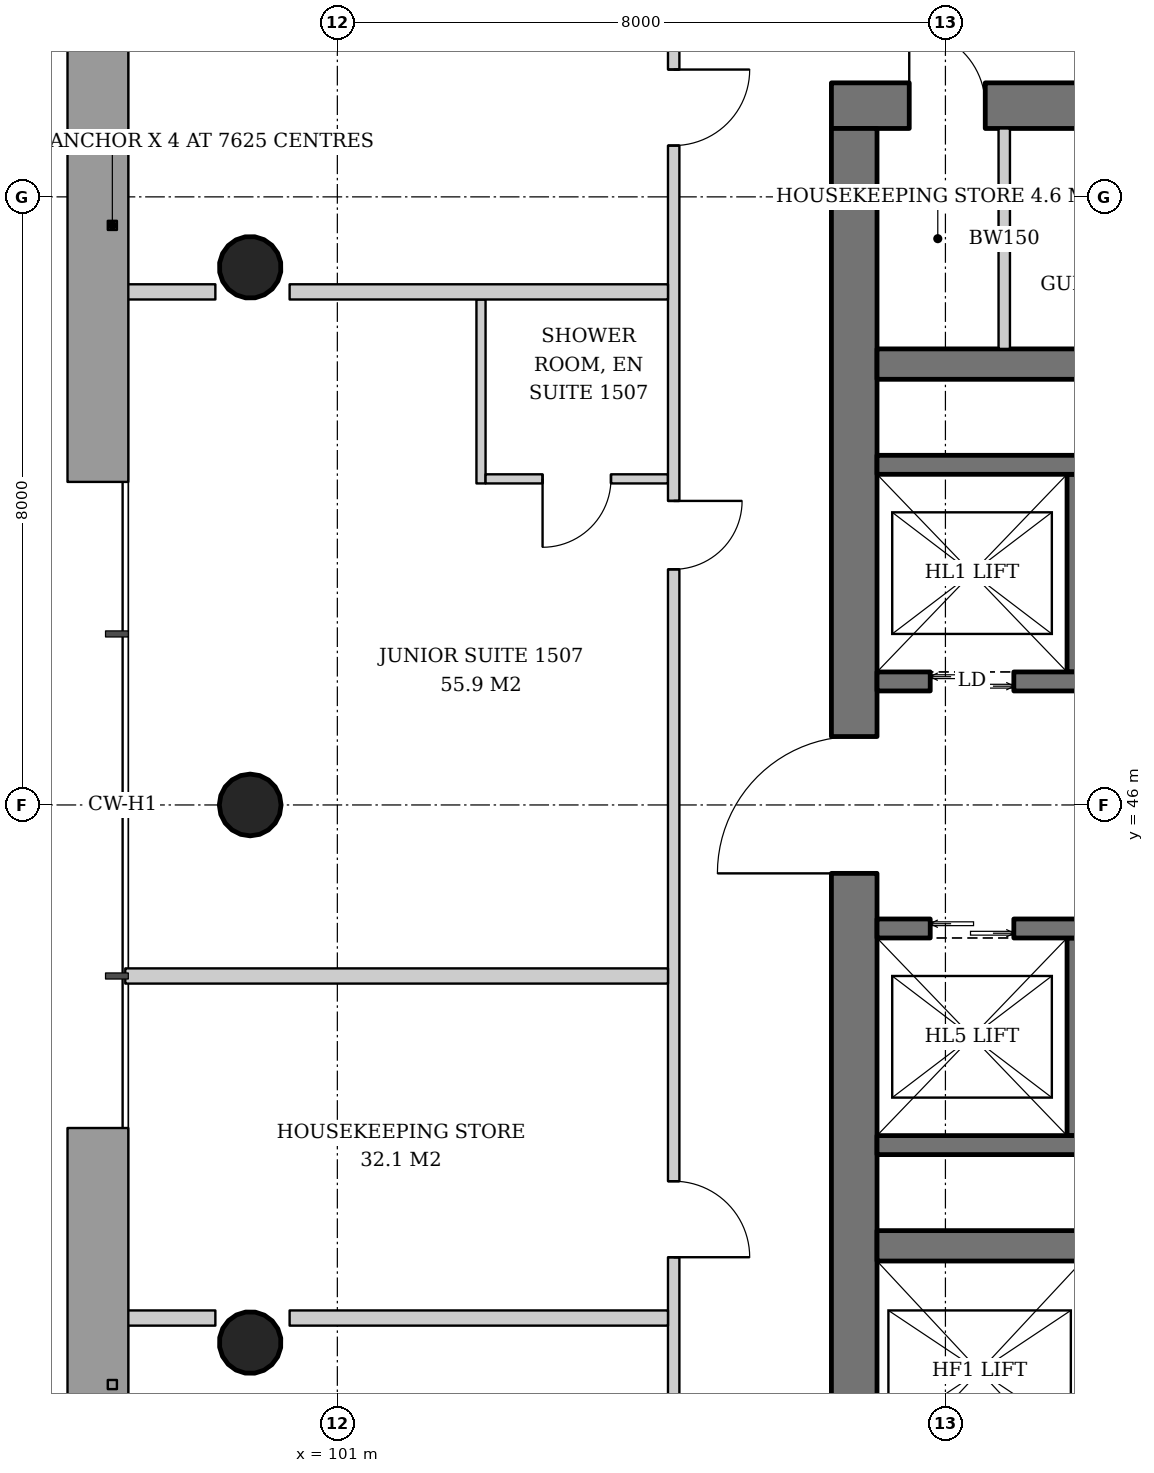
"""IFC4 building model, lengths in metres.
Left out: names, types, materials, properties, quantities, classifications, styles, units other than length and angle.
Written with IfcOpenShell. Run it as: python <this file> out.ifc"""

import sys

from ifc_helpers import new_model, si_unit, direction, frame, frame_2d, origin, origin_2d, place, context, subcontext, project, spatial, rectangle, hollow_circle, extrude, element, fill, save


model = new_model("IFC4")
c1 = context("Model", 3, precision=1e-05, world=origin(), true_north=direction((0.0, 1.0)))
c2 = subcontext(c1, "Body", "Model", "MODEL_VIEW")
j1 = project(units=[si_unit("LENGTHUNIT", "METRE"), si_unit("PLANEANGLEUNIT", "RADIAN")], contexts=[c1])
p1 = place(None, origin())
s1 = spatial("IfcSite", under=j1, at=p1, CompositionType="ELEMENT")
p2 = place(p1, origin())
s2 = spatial("IfcBuilding", under=s1, at=p2, CompositionType="ELEMENT")
p3 = place(p2, frame((0.0, 0.0, 62.8)))
s3 = spatial("IfcBuildingStorey", under=s2, at=p3, CompositionType="ELEMENT", Elevation=62.8)
p4 = place(p3, frame((99.802, 53.099, 0.0), z_axis=(0.043059584825, -0.021497706284, 0.998841188968), x_axis=(0.446680166538, 0.894693706707, 0.0)))
e1 = element("IfcColumn", 1, at=p4, inside=s3, PredefinedType="COLUMN", context=c2, shape_type="SweptSolid", body=[
    extrude(hollow_circle(Radius=0.406, WallThickness=0.03, at=origin_2d()), origin(), (0.0, 0.0, 1.0), 3.804),
])
p5 = place(p3, frame((99.802, 46.0, 0.0), z_axis=(0.043069538298, 0.0, 0.999072076915), x_axis=(0.0, 1.0, 0.0)))
e2 = element("IfcColumn", 2, at=p5, inside=s3, PredefinedType="COLUMN", context=c2, shape_type="SweptSolid", body=[
    extrude(hollow_circle(Radius=0.406, WallThickness=0.03, at=origin_2d()), origin(), (0.0, 0.0, 1.0), 3.803),
])
p6 = place(p3, frame((99.802, 38.901, 0.0), z_axis=(0.043059584825, 0.021497706284, 0.998841188968), x_axis=(-0.446680166538, 0.894693706707, 0.0)))
e3 = element("IfcColumn", 3, at=p6, inside=s3, PredefinedType="COLUMN", context=c2, shape_type="SweptSolid", body=[
    extrude(hollow_circle(Radius=0.406, WallThickness=0.03, at=origin_2d()), origin(), (0.0, 0.0, 1.0), 3.804),
])
p7 = place(p3, frame((107.5, 55.2, 0.0), z_axis=(0.0, 0.0, 1.0), x_axis=(1.0, 0.0, 0.0)))
e4 = element("IfcWall", 4, at=p7, inside=s3, PredefinedType="SHEAR", context=c2, shape_type="SweptSolid", body=[
    extrude(rectangle(XDim=19.0, YDim=0.6, at=frame_2d((9.5, 0.0))), origin(), (0.0, 0.0, 1.0), 3.8),
])
p8 = place(p7, frame((14.14, 0.0, 0.0)))
e5 = element("IfcOpeningElement", 5, at=p8, cuts=e4, PredefinedType="OPENING", context=c2, shape_type="SweptSolid", body=[
    extrude(rectangle(XDim=1.0, YDim=2.1, at=frame_2d((0.5, 1.05))), frame((0.0, 0.31, 0.0), z_axis=(0.0, -1.0, 0.0), x_axis=(1.0, 0.0, 0.0)), (0.0, 0.0, 1.0), 0.62),
])
p9 = place(p7, frame((1.024, 0.0, 0.0)))
e6 = element("IfcOpeningElement", 6, at=p9, cuts=e4, PredefinedType="OPENING", context=c2, shape_type="SweptSolid", body=[
    extrude(rectangle(XDim=1.0, YDim=2.1, at=frame_2d((0.5, 1.05))), frame((0.0, 0.31, 0.0), z_axis=(0.0, -1.0, 0.0), x_axis=(1.0, 0.0, 0.0)), (0.0, 0.0, 1.0), 0.62),
])
p10 = place(p7, frame((3.262, 0.0, 0.0)))
e7 = element("IfcOpeningElement", 7, at=p10, cuts=e4, PredefinedType="OPENING", context=c2, shape_type="SweptSolid", body=[
    extrude(rectangle(XDim=1.0, YDim=2.1, at=frame_2d((0.5, 1.05))), frame((0.0, 0.31, 0.0), z_axis=(0.0, -1.0, 0.0), x_axis=(1.0, 0.0, 0.0)), (0.0, 0.0, 1.0), 0.62),
])
p11 = place(p3, frame((107.8, 37.1, 0.0), z_axis=(0.0, 0.0, 1.0), x_axis=(0.0, 1.0, 0.0)))
e8 = element("IfcWall", 8, at=p11, inside=s3, PredefinedType="SHEAR", context=c2, shape_type="SweptSolid", body=[
    extrude(rectangle(XDim=17.8, YDim=0.6, at=frame_2d((8.9, 0.0))), origin(), (0.0, 0.0, 1.0), 3.8),
])
p12 = place(p11, frame((8.0, 0.0, 0.0)))
e9 = element("IfcOpeningElement", 9, at=p12, cuts=e8, PredefinedType="OPENING", context=c2, shape_type="SweptSolid", body=[
    extrude(rectangle(XDim=1.8, YDim=2.4, at=frame_2d((0.9, 1.2))), frame((0.0, 0.31, 0.0), z_axis=(0.0, -1.0, 0.0), x_axis=(1.0, 0.0, 0.0)), (0.0, 0.0, 1.0), 0.62),
])
for number, where, z_axis, x_axis in (
    (10, (108.1, 40.2, 0.0), (0.0, 0.0, 1.0), (1.0, 0.0, 0.0)),
    (11, (108.1, 51.8, 0.0), (0.0, 0.0, 1.0), (1.0, 0.0, 0.0)),
):
    element("IfcWall", number, at=place(p3, frame(where, z_axis=z_axis, x_axis=x_axis)), inside=s3, PredefinedType="SHEAR", context=c2, shape_type="SweptSolid", body=[
        extrude(rectangle(XDim=17.8, YDim=0.4, at=frame_2d((8.9, 0.0))), origin(), (0.0, 0.0, 1.0), 3.8),
    ])
p13 = place(p3, frame((110.725, 47.75, 0.0), z_axis=(0.0, 0.0, 1.0), x_axis=(0.0, 1.0, 0.0)))
e12 = element("IfcWall", 12, at=p13, inside=s3, PredefinedType="SHEAR", context=c2, shape_type="SweptSolid", body=[
    extrude(rectangle(XDim=2.6, YDim=0.25, at=frame_2d((1.3, 0.0))), origin(), (0.0, 0.0, 1.0), 3.8),
])
p14 = place(p3, frame((108.1, 50.475, 0.0), z_axis=(0.0, 0.0, 1.0), x_axis=(1.0, 0.0, 0.0)))
e13 = element("IfcWall", 13, at=p14, inside=s3, PredefinedType="SHEAR", context=c2, shape_type="SweptSolid", body=[
    extrude(rectangle(XDim=11.0, YDim=0.25, at=frame_2d((5.5, 0.0))), origin(), (0.0, 0.0, 1.0), 3.8),
])
p15 = place(p3, frame((108.1, 47.625, 0.0), z_axis=(0.0, 0.0, 1.0), x_axis=(1.0, 0.0, 0.0)))
e14 = element("IfcWall", 14, at=p15, inside=s3, PredefinedType="SHEAR", context=c2, shape_type="SweptSolid", body=[
    extrude(rectangle(XDim=12.83, YDim=0.25, at=frame_2d((6.415, 0.0))), origin(), (0.0, 0.0, 1.0), 3.8),
])
p16 = place(p15, frame((0.7, 0.0, 0.0)))
e15 = element("IfcOpeningElement", 15, at=p16, cuts=e14, PredefinedType="OPENING", context=c2, shape_type="SweptSolid", body=[
    extrude(rectangle(XDim=1.1, YDim=2.2, at=frame_2d((0.55, 1.1))), frame((0.0, 0.135, 0.0), z_axis=(0.0, -1.0, 0.0), x_axis=(1.0, 0.0, 0.0)), (0.0, 0.0, 1.0), 0.27),
])
p17 = place(p15, frame((3.45, 0.0, 0.0)))
e16 = element("IfcOpeningElement", 16, at=p17, cuts=e14, PredefinedType="OPENING", context=c2, shape_type="SweptSolid", body=[
    extrude(rectangle(XDim=1.1, YDim=2.2, at=frame_2d((0.55, 1.1))), frame((0.0, 0.135, 0.0), z_axis=(0.0, -1.0, 0.0), x_axis=(1.0, 0.0, 0.0)), (0.0, 0.0, 1.0), 0.27),
])
p18 = place(p15, frame((6.2, 0.0, 0.0)))
e17 = element("IfcOpeningElement", 17, at=p18, cuts=e14, PredefinedType="OPENING", context=c2, shape_type="SweptSolid", body=[
    extrude(rectangle(XDim=1.1, YDim=2.2, at=frame_2d((0.55, 1.1))), frame((0.0, 0.135, 0.0), z_axis=(0.0, -1.0, 0.0), x_axis=(1.0, 0.0, 0.0)), (0.0, 0.0, 1.0), 0.27),
])
p19 = place(p15, frame((8.95, 0.0, 0.0)))
e18 = element("IfcOpeningElement", 18, at=p19, cuts=e14, PredefinedType="OPENING", context=c2, shape_type="SweptSolid", body=[
    extrude(rectangle(XDim=1.1, YDim=2.2, at=frame_2d((0.55, 1.1))), frame((0.0, 0.135, 0.0), z_axis=(0.0, -1.0, 0.0), x_axis=(1.0, 0.0, 0.0)), (0.0, 0.0, 1.0), 0.27),
])
p20 = place(p15, frame((11.515, 0.0, 0.0)))
e19 = element("IfcOpeningElement", 19, at=p20, cuts=e14, PredefinedType="OPENING", context=c2, shape_type="SweptSolid", body=[
    extrude(rectangle(XDim=0.8, YDim=2.0, at=frame_2d((0.4, 1.0))), frame((0.0, 0.135, 0.0), z_axis=(0.0, -1.0, 0.0), x_axis=(1.0, 0.0, 0.0)), (0.0, 0.0, 1.0), 0.27),
])
p21 = place(p3, frame((110.725, 44.25, 0.0), z_axis=(0.0, 0.0, 1.0), x_axis=(0.0, -1.0, 0.0)))
e20 = element("IfcWall", 20, at=p21, inside=s3, PredefinedType="SHEAR", context=c2, shape_type="SweptSolid", body=[
    extrude(rectangle(XDim=2.6, YDim=0.25, at=frame_2d((1.3, 0.0))), origin(), (0.0, 0.0, 1.0), 3.8),
])
p22 = place(p3, frame((108.1, 41.525, 0.0), z_axis=(0.0, 0.0, 1.0), x_axis=(1.0, 0.0, 0.0)))
e21 = element("IfcWall", 21, at=p22, inside=s3, PredefinedType="SHEAR", context=c2, shape_type="SweptSolid", body=[
    extrude(rectangle(XDim=11.0, YDim=0.25, at=frame_2d((5.5, 0.0))), origin(), (0.0, 0.0, 1.0), 3.8),
])
p23 = place(p3, frame((108.1, 44.375, 0.0), z_axis=(0.0, 0.0, 1.0), x_axis=(1.0, 0.0, 0.0)))
e22 = element("IfcWall", 22, at=p23, inside=s3, PredefinedType="SHEAR", context=c2, shape_type="SweptSolid", body=[
    extrude(rectangle(XDim=12.83, YDim=0.25, at=frame_2d((6.415, 0.0))), origin(), (0.0, 0.0, 1.0), 3.8),
])
p24 = place(p23, frame((0.7, 0.0, 0.0)))
e23 = element("IfcOpeningElement", 23, at=p24, cuts=e22, PredefinedType="OPENING", context=c2, shape_type="SweptSolid", body=[
    extrude(rectangle(XDim=1.1, YDim=2.2, at=frame_2d((0.55, 1.1))), frame((0.0, 0.135, 0.0), z_axis=(0.0, -1.0, 0.0), x_axis=(1.0, 0.0, 0.0)), (0.0, 0.0, 1.0), 0.27),
])
p25 = place(p23, frame((3.45, 0.0, 0.0)))
e24 = element("IfcOpeningElement", 24, at=p25, cuts=e22, PredefinedType="OPENING", context=c2, shape_type="SweptSolid", body=[
    extrude(rectangle(XDim=1.1, YDim=2.2, at=frame_2d((0.55, 1.1))), frame((0.0, 0.135, 0.0), z_axis=(0.0, -1.0, 0.0), x_axis=(1.0, 0.0, 0.0)), (0.0, 0.0, 1.0), 0.27),
])
p26 = place(p23, frame((6.2, 0.0, 0.0)))
e25 = element("IfcOpeningElement", 25, at=p26, cuts=e22, PredefinedType="OPENING", context=c2, shape_type="SweptSolid", body=[
    extrude(rectangle(XDim=1.1, YDim=2.2, at=frame_2d((0.55, 1.1))), frame((0.0, 0.135, 0.0), z_axis=(0.0, -1.0, 0.0), x_axis=(1.0, 0.0, 0.0)), (0.0, 0.0, 1.0), 0.27),
])
p27 = place(p23, frame((9.0, 0.0, 0.0)))
e26 = element("IfcOpeningElement", 26, at=p27, cuts=e22, PredefinedType="OPENING", context=c2, shape_type="SweptSolid", body=[
    extrude(rectangle(XDim=1.0, YDim=2.1, at=frame_2d((0.5, 1.05))), frame((0.0, 0.135, 0.0), z_axis=(0.0, -1.0, 0.0), x_axis=(1.0, 0.0, 0.0)), (0.0, 0.0, 1.0), 0.27),
])
p28 = place(p23, frame((11.515, 0.0, 0.0)))
e27 = element("IfcOpeningElement", 27, at=p28, cuts=e22, PredefinedType="OPENING", context=c2, shape_type="SweptSolid", body=[
    extrude(rectangle(XDim=0.8, YDim=2.0, at=frame_2d((0.4, 1.0))), frame((0.0, 0.135, 0.0), z_axis=(0.0, -1.0, 0.0), x_axis=(1.0, 0.0, 0.0)), (0.0, 0.0, 1.0), 0.27),
])
p29 = place(p3, frame((109.774, 52.0, 0.0), z_axis=(0.0, 0.0, 1.0), x_axis=(0.0, 1.0, 0.0)))
e28 = element("IfcWall", 28, at=p29, inside=s3, PredefinedType="SOLIDWALL", context=c2, shape_type="SweptSolid", body=[
    extrude(rectangle(XDim=2.9, YDim=0.15, at=frame_2d((1.45, 0.0))), origin(), (0.0, 0.0, 1.0), 3.6),
])
p30 = place(p3, frame((102.89, 52.65, 0.0), z_axis=(0.0, 0.0, 1.0), x_axis=(0.0, -1.0, 0.0)))
e29 = element("IfcWall", 29, at=p30, inside=s3, PredefinedType="PARTITIONING", context=c2, shape_type="SweptSolid", body=[
    extrude(rectangle(XDim=2.42, YDim=0.12, at=frame_2d((1.21, 0.0))), origin(), (0.0, 0.0, 1.0), 2.847),
])
p31 = place(p3, frame((105.35, 50.29, 0.0), z_axis=(0.0, 0.0, 1.0), x_axis=(-1.0, 0.0, 0.0)))
e30 = element("IfcWall", 30, at=p31, inside=s3, PredefinedType="PARTITIONING", context=c2, shape_type="SweptSolid", body=[
    extrude(rectangle(XDim=2.4, YDim=0.12, at=frame_2d((1.2, 0.0))), origin(), (0.0, 0.0, 1.0), 3.6),
])
p32 = place(p31, frame((0.75, 0.0, 0.0)))
e31 = element("IfcOpeningElement", 31, at=p32, cuts=e30, PredefinedType="OPENING", context=c2, shape_type="SweptSolid", body=[
    extrude(rectangle(XDim=0.9, YDim=2.1, at=frame_2d((0.45, 1.05))), frame((0.0, 0.07, 0.0), z_axis=(0.0, -1.0, 0.0), x_axis=(1.0, 0.0, 0.0)), (0.0, 0.0, 1.0), 0.14),
])
p33 = place(p3, frame((105.425, 57.65, 0.0), z_axis=(0.0, 0.0, 1.0), x_axis=(0.0, -1.0, 0.0)))
e32 = element("IfcWall", 32, at=p33, inside=s3, PredefinedType="PARTITIONING", context=c2, shape_type="SweptSolid", body=[
    extrude(rectangle(XDim=23.15, YDim=0.15, at=frame_2d((11.575, 0.0))), origin(), (0.0, 0.0, 1.0), 2.8),
])
p34 = place(p33, frame((1.975, 0.0, 0.0)))
e33 = element("IfcOpeningElement", 33, at=p34, cuts=e32, PredefinedType="OPENING", context=c2, shape_type="SweptSolid", body=[
    extrude(rectangle(XDim=1.0, YDim=2.1, at=frame_2d((0.5, 1.05))), frame((0.0, 0.085, 0.0), z_axis=(0.0, -1.0, 0.0), x_axis=(1.0, 0.0, 0.0)), (0.0, 0.0, 1.0), 0.17),
])
p35 = place(p33, frame((7.65, 0.0, 0.0)))
e34 = element("IfcOpeningElement", 34, at=p35, cuts=e32, PredefinedType="OPENING", context=c2, shape_type="SweptSolid", body=[
    extrude(rectangle(XDim=0.9, YDim=2.1, at=frame_2d((0.45, 1.05))), frame((0.0, 0.085, 0.0), z_axis=(0.0, -1.0, 0.0), x_axis=(1.0, 0.0, 0.0)), (0.0, 0.0, 1.0), 0.17),
])
p36 = place(p33, frame((16.6, 0.0, 0.0)))
e35 = element("IfcOpeningElement", 35, at=p36, cuts=e32, PredefinedType="OPENING", context=c2, shape_type="SweptSolid", body=[
    extrude(rectangle(XDim=1.0, YDim=2.1, at=frame_2d((0.5, 1.05))), frame((0.0, 0.085, 0.0), z_axis=(0.0, -1.0, 0.0), x_axis=(1.0, 0.0, 0.0)), (0.0, 0.0, 1.0), 0.17),
])
p37 = place(p3, frame((105.35, 52.75, 0.0), z_axis=(0.0, 0.0, 1.0), x_axis=(-1.0, 0.0, 0.0)))
e36 = element("IfcWall", 36, at=p37, inside=s3, PredefinedType="PARTITIONING", context=c2, shape_type="SweptSolid", body=[
    extrude(rectangle(XDim=4.978, YDim=0.2, at=frame_2d((2.489, 0.0))), origin(), (0.0, 0.0, 1.0), 3.6),
])
p38 = place(p3, frame((99.395, 52.75, 0.0), z_axis=(0.0, 0.0, 1.0), x_axis=(-1.0, 0.0, 0.0)))
e37 = element("IfcWall", 37, at=p38, inside=s3, PredefinedType="PARTITIONING", context=c2, shape_type="SweptSolid", body=[
    extrude(rectangle(XDim=1.185, YDim=0.2, at=frame_2d((0.593, 0.0))), origin(), (0.0, 0.0, 1.0), 3.6),
])
p39 = place(p3, frame((105.35, 43.75, 0.0), z_axis=(0.0, 0.0, 1.0), x_axis=(-1.0, 0.0, 0.0)))
e38 = element("IfcWall", 38, at=p39, inside=s3, PredefinedType="PARTITIONING", context=c2, shape_type="SweptSolid", body=[
    extrude(rectangle(XDim=7.14, YDim=0.2, at=frame_2d((3.57, 0.0))), origin(), (0.0, 0.0, 1.0), 3.05),
])
p40 = place(p3, frame((105.35, 39.25, 0.0), z_axis=(0.0, 0.0, 1.0), x_axis=(-1.0, 0.0, 0.0)))
e39 = element("IfcWall", 39, at=p40, inside=s3, PredefinedType="PARTITIONING", context=c2, shape_type="SweptSolid", body=[
    extrude(rectangle(XDim=4.978, YDim=0.2, at=frame_2d((2.489, 0.0))), origin(), (0.0, 0.0, 1.0), 3.6),
])
p41 = place(p3, frame((99.395, 39.25, 0.0), z_axis=(0.0, 0.0, 1.0), x_axis=(-1.0, 0.0, 0.0)))
e40 = element("IfcWall", 40, at=p41, inside=s3, PredefinedType="PARTITIONING", context=c2, shape_type="SweptSolid", body=[
    extrude(rectangle(XDim=1.185, YDim=0.2, at=frame_2d((0.593, 0.0))), origin(), (0.0, 0.0, 1.0), 3.6),
])
p42 = place(p16, origin())
e41 = element("IfcDoor", 41, at=p42, inside=s3, OperationType="DOUBLE_DOOR_SLIDING", PredefinedType="DOOR", context=c2, shape_type="SweptSolid", body=[
    extrude(rectangle(XDim=1.1, YDim=2.2, at=frame_2d((0.55, 1.1))), frame((0.0, 0.025, 0.0), z_axis=(0.0, -1.0, 0.0), x_axis=(1.0, 0.0, 0.0)), (0.0, 0.0, 1.0), 0.05),
])
fill(e15, e41)
p43 = place(p24, origin())
e42 = element("IfcDoor", 42, at=p43, inside=s3, OperationType="DOUBLE_DOOR_SLIDING", PredefinedType="DOOR", context=c2, shape_type="SweptSolid", body=[
    extrude(rectangle(XDim=1.1, YDim=2.2, at=frame_2d((0.55, 1.1))), frame((0.0, 0.025, 0.0), z_axis=(0.0, -1.0, 0.0), x_axis=(1.0, 0.0, 0.0)), (0.0, 0.0, 1.0), 0.05),
])
fill(e23, e42)
p44 = place(p12, origin())
e43 = element("IfcDoor", 43, at=p44, inside=s3, OperationType="DOUBLE_DOOR_SINGLE_SWING", PredefinedType="DOOR", context=c2, shape_type="SweptSolid", body=[
    extrude(rectangle(XDim=1.8, YDim=2.4, at=frame_2d((0.9, 1.2))), frame((0.0, 0.025, 0.0), z_axis=(0.0, -1.0, 0.0), x_axis=(1.0, 0.0, 0.0)), (0.0, 0.0, 1.0), 0.05),
])
fill(e9, e43)
p45 = place(p9, origin())
e44 = element("IfcDoor", 44, at=p45, inside=s3, OperationType="SINGLE_SWING_LEFT", PredefinedType="DOOR", context=c2, shape_type="SweptSolid", body=[
    extrude(rectangle(XDim=1.0, YDim=2.1, at=frame_2d((0.5, 1.05))), frame((0.0, -0.24, 0.0), z_axis=(0.0, -1.0, 0.0), x_axis=(1.0, 0.0, 0.0)), (0.0, 0.0, 1.0), 0.05),
])
fill(e6, e44)
p46 = place(p32, origin())
e45 = element("IfcDoor", 45, at=p46, inside=s3, OperationType="SINGLE_SWING_RIGHT", PredefinedType="DOOR", context=c2, shape_type="SweptSolid", body=[
    extrude(rectangle(XDim=0.9, YDim=2.1, at=frame_2d((0.45, 1.05))), frame((0.0, 0.025, 0.0), z_axis=(0.0, -1.0, 0.0), x_axis=(1.0, 0.0, 0.0)), (0.0, 0.0, 1.0), 0.05),
])
fill(e31, e45)
p47 = place(p34, origin())
e46 = element("IfcDoor", 46, at=p47, inside=s3, OperationType="SINGLE_SWING_LEFT", PredefinedType="DOOR", context=c2, shape_type="SweptSolid", body=[
    extrude(rectangle(XDim=1.0, YDim=2.1, at=frame_2d((0.5, 1.05))), frame((0.0, 0.025, 0.0), z_axis=(0.0, -1.0, 0.0), x_axis=(1.0, 0.0, 0.0)), (0.0, 0.0, 1.0), 0.05),
])
fill(e33, e46)
p48 = place(p35, origin())
e47 = element("IfcDoor", 47, at=p48, inside=s3, OperationType="SINGLE_SWING_LEFT", PredefinedType="DOOR", context=c2, shape_type="SweptSolid", body=[
    extrude(rectangle(XDim=0.9, YDim=2.1, at=frame_2d((0.45, 1.05))), frame((0.0, 0.025, 0.0), z_axis=(0.0, -1.0, 0.0), x_axis=(1.0, 0.0, 0.0)), (0.0, 0.0, 1.0), 0.05),
])
fill(e34, e47)
p49 = place(p36, origin())
e48 = element("IfcDoor", 48, at=p49, inside=s3, OperationType="SINGLE_SWING_RIGHT", PredefinedType="DOOR", context=c2, shape_type="SweptSolid", body=[
    extrude(rectangle(XDim=1.0, YDim=2.1, at=frame_2d((0.5, 1.05))), frame((0.0, 0.025, 0.0), z_axis=(0.0, -1.0, 0.0), x_axis=(1.0, 0.0, 0.0)), (0.0, 0.0, 1.0), 0.05),
])
fill(e35, e48)
save(model, sys.argv[1])
